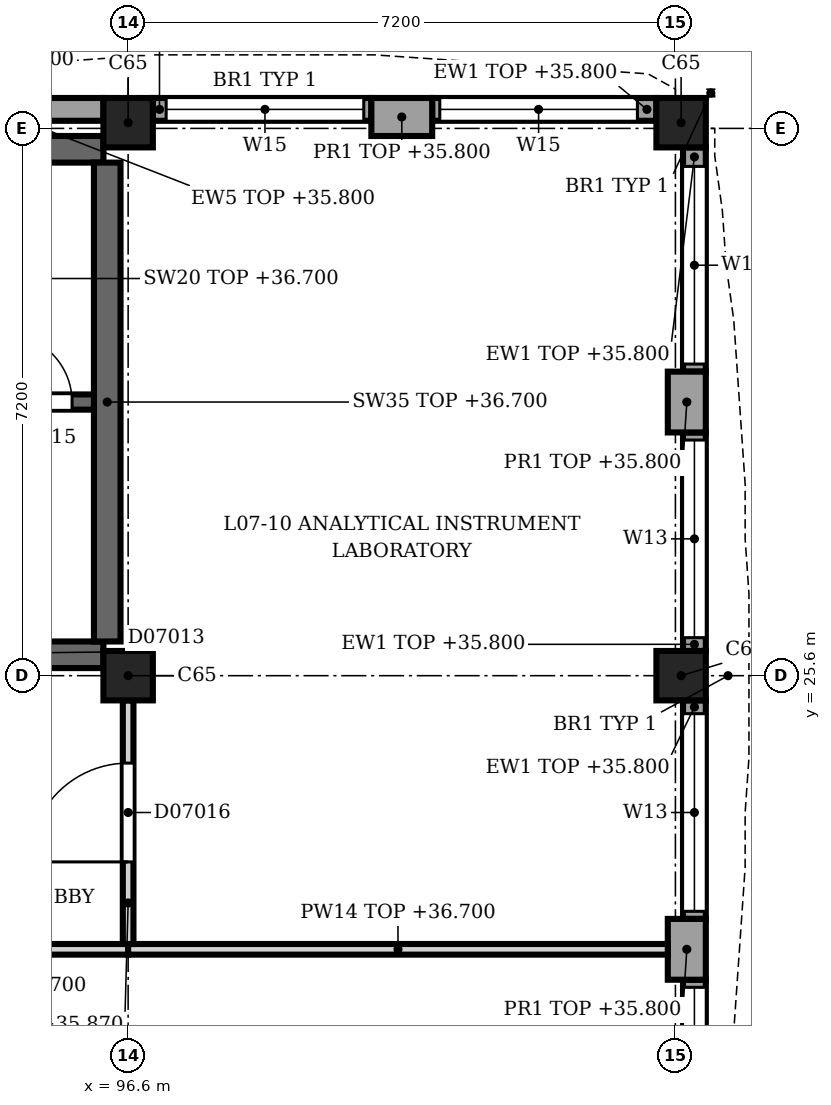
"""IFC4 building model, lengths in metres.
Left out: names, types, materials, properties, quantities, classifications, styles, units other than length and angle.
Written with IfcOpenShell. Run it as: python <this file> out.ifc"""

import sys

from ifc_helpers import new_model, si_unit, direction, frame, frame_2d, origin, origin_2d, place, context, subcontext, project, spatial, rectangle, extrude, element, fill, save


model = new_model("IFC4")
c1 = context("Model", 3, precision=1e-05, world=origin(), true_north=direction((0.0, 1.0)))
c2 = subcontext(c1, "Body", "Model", "MODEL_VIEW")
j1 = project(units=[si_unit("LENGTHUNIT", "METRE"), si_unit("PLANEANGLEUNIT", "RADIAN")], contexts=[c1])
p1 = place(None, origin())
s1 = spatial("IfcSite", under=j1, at=p1, CompositionType="ELEMENT")
p2 = place(p1, origin())
s2 = spatial("IfcBuilding", under=s1, at=p2, CompositionType="ELEMENT")
p3 = place(p2, frame((0.0, 0.0, 32.4)))
s3 = spatial("IfcBuildingStorey", under=s2, at=p3, CompositionType="ELEMENT", Elevation=32.4)
for number, where, z_axis, x_axis in (
    (1, (96.6, 25.6, 0.0), (0.0, 0.0, 1.0), (1.0, 0.0, 0.0)),
    (2, (96.6, 32.875, 0.0), (0.0, 0.0, 1.0), (1.0, 0.0, 0.0)),
    (3, (103.875, 25.6, 0.0), (0.0, 0.0, 1.0), (1.0, 0.0, 0.0)),
    (4, (103.875, 32.875, 0.0), (0.0, 0.0, 1.0), (1.0, 0.0, 0.0)),
):
    element("IfcColumn", number, at=place(p3, frame(where, z_axis=z_axis, x_axis=x_axis)), inside=s3, PredefinedType="COLUMN", context=c2, shape_type="SweptSolid", body=[
        extrude(rectangle(XDim=0.65, YDim=0.65, at=origin_2d()), origin(), (0.0, 0.0, 1.0), 4.5),
    ])
p4 = place(p3, frame((99.8, 32.95, 0.0), z_axis=(0.0, 0.0, 1.0), x_axis=(1.0, 0.0, 0.0)))
e5 = element("IfcWall", 5, at=p4, inside=s3, PredefinedType="SOLIDWALL", context=c2, shape_type="SweptSolid", body=[
    extrude(rectangle(XDim=0.8, YDim=0.5, at=frame_2d((0.4, 0.0))), origin(), (0.0, 0.0, 1.0), 3.4),
])
p5 = place(p3, frame((93.4, 33.05, 0.0), z_axis=(0.0, 0.0, 1.0), x_axis=(1.0, 0.0, 0.0)))
e6 = element("IfcWall", 6, at=p5, inside=s3, PredefinedType="SOLIDWALL", context=c2, shape_type="SweptSolid", body=[
    extrude(rectangle(XDim=2.875, YDim=0.3, at=frame_2d((1.438, 0.0))), origin(), (0.0, 0.0, 1.0), 3.4),
])
p6 = place(p3, frame((96.925, 33.05, 0.0), z_axis=(0.0, 0.0, 1.0), x_axis=(1.0, 0.0, 0.0)))
e7 = element("IfcWall", 7, at=p6, inside=s3, PredefinedType="SOLIDWALL", context=c2, shape_type="SweptSolid", body=[
    extrude(rectangle(XDim=2.875, YDim=0.3, at=frame_2d((1.438, 0.0))), origin(), (0.0, 0.0, 1.0), 3.4),
])
p7 = place(p6, frame((0.175, 0.0, 1.0)))
e8 = element("IfcOpeningElement", 8, at=p7, cuts=e7, PredefinedType="OPENING", context=c2, shape_type="SweptSolid", body=[
    extrude(rectangle(XDim=2.6, YDim=2.0, at=frame_2d((1.3, 1.0))), frame((0.0, 0.16, 0.0), z_axis=(0.0, -1.0, 0.0), x_axis=(1.0, 0.0, 0.0)), (0.0, 0.0, 1.0), 0.32),
])
p8 = place(p3, frame((100.6, 33.05, 0.0), z_axis=(0.0, 0.0, 1.0), x_axis=(1.0, 0.0, 0.0)))
e9 = element("IfcWall", 9, at=p8, inside=s3, PredefinedType="SOLIDWALL", context=c2, shape_type="SweptSolid", body=[
    extrude(rectangle(XDim=2.95, YDim=0.3, at=frame_2d((1.475, 0.0))), origin(), (0.0, 0.0, 1.0), 3.4),
])
p9 = place(p8, frame((0.1, 0.0, 1.0)))
e10 = element("IfcOpeningElement", 10, at=p9, cuts=e9, PredefinedType="OPENING", context=c2, shape_type="SweptSolid", body=[
    extrude(rectangle(XDim=2.6, YDim=2.0, at=frame_2d((1.3, 1.0))), frame((0.0, 0.16, 0.0), z_axis=(0.0, -1.0, 0.0), x_axis=(1.0, 0.0, 0.0)), (0.0, 0.0, 1.0), 0.32),
])
p10 = place(p3, frame((103.95, 29.6, 0.0), z_axis=(0.0, 0.0, 1.0), x_axis=(0.0, -1.0, 0.0)))
e11 = element("IfcWall", 11, at=p10, inside=s3, PredefinedType="SOLIDWALL", context=c2, shape_type="SweptSolid", body=[
    extrude(rectangle(XDim=0.8, YDim=0.5, at=frame_2d((0.4, 0.0))), origin(), (0.0, 0.0, 1.0), 3.4),
])
p11 = place(p3, frame((103.95, 22.4, 0.0), z_axis=(0.0, 0.0, 1.0), x_axis=(0.0, -1.0, 0.0)))
e12 = element("IfcWall", 12, at=p11, inside=s3, PredefinedType="SOLIDWALL", context=c2, shape_type="SweptSolid", body=[
    extrude(rectangle(XDim=0.8, YDim=0.5, at=frame_2d((0.4, 0.0))), origin(), (0.0, 0.0, 1.0), 3.4),
])
p12 = place(p3, frame((104.05, 32.55, 0.0), z_axis=(0.0, 0.0, 1.0), x_axis=(0.0, -1.0, 0.0)))
e13 = element("IfcWall", 13, at=p12, inside=s3, PredefinedType="SOLIDWALL", context=c2, shape_type="SweptSolid", body=[
    extrude(rectangle(XDim=2.95, YDim=0.3, at=frame_2d((1.475, 0.0))), origin(), (0.0, 0.0, 1.0), 3.4),
])
p13 = place(p12, frame((0.25, 0.0, 0.9)))
e14 = element("IfcOpeningElement", 14, at=p13, cuts=e13, PredefinedType="OPENING", context=c2, shape_type="SweptSolid", body=[
    extrude(rectangle(XDim=2.6, YDim=2.2, at=frame_2d((1.3, 1.1))), frame((0.0, 0.16, 0.0), z_axis=(0.0, -1.0, 0.0), x_axis=(1.0, 0.0, 0.0)), (0.0, 0.0, 1.0), 0.32),
])
p14 = place(p3, frame((104.05, 28.8, 0.0), z_axis=(0.0, 0.0, 1.0), x_axis=(0.0, -1.0, 0.0)))
e15 = element("IfcWall", 15, at=p14, inside=s3, PredefinedType="SOLIDWALL", context=c2, shape_type="SweptSolid", body=[
    extrude(rectangle(XDim=2.875, YDim=0.3, at=frame_2d((1.438, 0.0))), origin(), (0.0, 0.0, 1.0), 3.4),
])
p15 = place(p14, frame((0.1, 0.0, 0.9)))
e16 = element("IfcOpeningElement", 16, at=p15, cuts=e15, PredefinedType="OPENING", context=c2, shape_type="SweptSolid", body=[
    extrude(rectangle(XDim=2.6, YDim=2.2, at=frame_2d((1.3, 1.1))), frame((0.0, 0.16, 0.0), z_axis=(0.0, -1.0, 0.0), x_axis=(1.0, 0.0, 0.0)), (0.0, 0.0, 1.0), 0.32),
])
p16 = place(p3, frame((104.05, 25.275, 0.0), z_axis=(0.0, 0.0, 1.0), x_axis=(0.0, -1.0, 0.0)))
e17 = element("IfcWall", 17, at=p16, inside=s3, PredefinedType="SOLIDWALL", context=c2, shape_type="SweptSolid", body=[
    extrude(rectangle(XDim=2.875, YDim=0.3, at=frame_2d((1.438, 0.0))), origin(), (0.0, 0.0, 1.0), 3.4),
])
p17 = place(p16, frame((0.175, 0.0, 0.9)))
e18 = element("IfcOpeningElement", 18, at=p17, cuts=e17, PredefinedType="OPENING", context=c2, shape_type="SweptSolid", body=[
    extrude(rectangle(XDim=2.6, YDim=2.2, at=frame_2d((1.3, 1.1))), frame((0.0, 0.16, 0.0), z_axis=(0.0, -1.0, 0.0), x_axis=(1.0, 0.0, 0.0)), (0.0, 0.0, 1.0), 0.32),
])
p18 = place(p3, frame((104.05, 21.6, 0.0), z_axis=(0.0, 0.0, 1.0), x_axis=(0.0, -1.0, 0.0)))
e19 = element("IfcWall", 19, at=p18, inside=s3, PredefinedType="SOLIDWALL", context=c2, shape_type="SweptSolid", body=[
    extrude(rectangle(XDim=2.875, YDim=0.3, at=frame_2d((1.438, 0.0))), origin(), (0.0, 0.0, 1.0), 3.4),
])
p19 = place(p18, frame((0.1, 0.0, 0.9)))
e20 = element("IfcOpeningElement", 20, at=p19, cuts=e19, PredefinedType="OPENING", context=c2, shape_type="SweptSolid", body=[
    extrude(rectangle(XDim=2.6, YDim=2.2, at=frame_2d((1.3, 1.1))), frame((0.0, 0.16, 0.0), z_axis=(0.0, -1.0, 0.0), x_axis=(1.0, 0.0, 0.0)), (0.0, 0.0, 1.0), 0.32),
])
p20 = place(p3, frame((89.725, 25.875, 0.0), z_axis=(0.0, 0.0, 1.0), x_axis=(1.0, 0.0, 0.0)))
e21 = element("IfcWall", 21, at=p20, inside=s3, PredefinedType="SHEAR", context=c2, shape_type="SweptSolid", body=[
    extrude(rectangle(XDim=6.55, YDim=0.35, at=frame_2d((3.275, 0.0))), origin(), (0.0, 0.0, 1.0), 4.3),
])
p21 = place(p20, frame((2.675, 0.0, 0.0)))
e22 = element("IfcOpeningElement", 22, at=p21, cuts=e21, PredefinedType="OPENING", context=c2, shape_type="SweptSolid", body=[
    extrude(rectangle(XDim=1.8, YDim=2.1, at=frame_2d((0.9, 1.05))), frame((0.0, 0.185, 0.0), z_axis=(0.0, -1.0, 0.0), x_axis=(1.0, 0.0, 0.0)), (0.0, 0.0, 1.0), 0.37),
])
p22 = place(p3, frame((89.725, 32.525, 0.0), z_axis=(0.0, 0.0, 1.0), x_axis=(1.0, 0.0, 0.0)))
e23 = element("IfcWall", 23, at=p22, inside=s3, PredefinedType="SHEAR", context=c2, shape_type="SweptSolid", body=[
    extrude(rectangle(XDim=6.55, YDim=0.35, at=frame_2d((3.275, 0.0))), origin(), (0.0, 0.0, 1.0), 4.3),
])
p23 = place(p3, frame((96.325, 26.05, 0.0), z_axis=(0.0, 0.0, 1.0), x_axis=(0.0, 1.0, 0.0)))
e24 = element("IfcWall", 24, at=p23, inside=s3, PredefinedType="SHEAR", context=c2, shape_type="SweptSolid", body=[
    extrude(rectangle(XDim=6.3, YDim=0.35, at=frame_2d((3.15, 0.0))), origin(), (0.0, 0.0, 1.0), 4.3),
])
p24 = place(p3, frame((96.15, 29.2, 0.0), z_axis=(0.0, 0.0, 1.0), x_axis=(-1.0, 0.0, 0.0)))
e25 = element("IfcWall", 25, at=p24, inside=s3, PredefinedType="SHEAR", context=c2, shape_type="SweptSolid", body=[
    extrude(rectangle(XDim=10.35, YDim=0.2, at=frame_2d((5.175, 0.0))), origin(), (0.0, 0.0, 1.0), 4.3),
])
p25 = place(p24, frame((8.8, 0.0, 0.0)))
e26 = element("IfcOpeningElement", 26, at=p25, cuts=e25, PredefinedType="OPENING", context=c2, shape_type="SweptSolid", body=[
    extrude(rectangle(XDim=1.1, YDim=2.1, at=frame_2d((0.55, 1.05))), frame((0.0, 0.11, 0.0), z_axis=(0.0, -1.0, 0.0), x_axis=(1.0, 0.0, 0.0)), (0.0, 0.0, 1.0), 0.22),
])
p26 = place(p24, frame((6.6, 0.0, 0.0)))
e27 = element("IfcOpeningElement", 27, at=p26, cuts=e25, PredefinedType="OPENING", context=c2, shape_type="SweptSolid", body=[
    extrude(rectangle(XDim=1.1, YDim=2.1, at=frame_2d((0.55, 1.05))), frame((0.0, 0.11, 0.0), z_axis=(0.0, -1.0, 0.0), x_axis=(1.0, 0.0, 0.0)), (0.0, 0.0, 1.0), 0.22),
])
p27 = place(p24, frame((3.75, 0.0, 0.0)))
e28 = element("IfcOpeningElement", 28, at=p27, cuts=e25, PredefinedType="OPENING", context=c2, shape_type="SweptSolid", body=[
    extrude(rectangle(XDim=1.4, YDim=2.1, at=frame_2d((0.7, 1.05))), frame((0.0, 0.11, 0.0), z_axis=(0.0, -1.0, 0.0), x_axis=(1.0, 0.0, 0.0)), (0.0, 0.0, 1.0), 0.22),
])
p28 = place(p24, frame((1.962, 0.0, 0.0)))
e29 = element("IfcOpeningElement", 29, at=p28, cuts=e25, PredefinedType="OPENING", context=c2, shape_type="SweptSolid", body=[
    extrude(rectangle(XDim=0.9, YDim=2.1, at=frame_2d((0.45, 1.05))), frame((0.0, 0.11, 0.0), z_axis=(0.0, -1.0, 0.0), x_axis=(1.0, 0.0, 0.0)), (0.0, 0.0, 1.0), 0.22),
])
p29 = place(p24, frame((0.288, 0.0, 0.0)))
e30 = element("IfcOpeningElement", 30, at=p29, cuts=e25, PredefinedType="OPENING", context=c2, shape_type="SweptSolid", body=[
    extrude(rectangle(XDim=0.9, YDim=2.1, at=frame_2d((0.45, 1.05))), frame((0.0, 0.11, 0.0), z_axis=(0.0, -1.0, 0.0), x_axis=(1.0, 0.0, 0.0)), (0.0, 0.0, 1.0), 0.22),
])
p30 = place(p3, frame((92.93, 22.0, 0.0), z_axis=(0.0, 0.0, 1.0), x_axis=(1.0, 0.0, 0.0)))
e31 = element("IfcWall", 31, at=p30, inside=s3, PredefinedType="PARTITIONING", context=c2, shape_type="SweptSolid", body=[
    extrude(rectangle(XDim=3.67, YDim=0.14, at=frame_2d((1.835, 0.0))), origin(), (0.0, 0.0, 1.0), 4.3),
])
p31 = place(p3, frame((96.6, 22.0, 0.0), z_axis=(0.0, 0.0, 1.0), x_axis=(1.0, 0.0, 0.0)))
e32 = element("IfcWall", 32, at=p31, inside=s3, PredefinedType="PARTITIONING", context=c2, shape_type="SweptSolid", body=[
    extrude(rectangle(XDim=7.1, YDim=0.14, at=frame_2d((3.55, 0.0))), origin(), (0.0, 0.0, 1.0), 4.3),
])
p32 = place(p3, frame((96.6, 25.275, 0.0), z_axis=(0.0, 0.0, 1.0), x_axis=(0.0, -1.0, 0.0)))
e33 = element("IfcWall", 33, at=p32, inside=s3, PredefinedType="PARTITIONING", context=c2, shape_type="SweptSolid", body=[
    extrude(rectangle(XDim=3.205, YDim=0.14, at=frame_2d((1.603, 0.0))), origin(), (0.0, 0.0, 1.0), 3.47),
])
p33 = place(p32, frame((0.825, 0.0, 0.0)))
e34 = element("IfcOpeningElement", 34, at=p33, cuts=e33, PredefinedType="OPENING", context=c2, shape_type="SweptSolid", body=[
    extrude(rectangle(XDim=1.3, YDim=2.2, at=frame_2d((0.65, 1.1))), frame((0.0, 0.08, 0.0), z_axis=(0.0, -1.0, 0.0), x_axis=(1.0, 0.0, 0.0)), (0.0, 0.0, 1.0), 0.16),
])
p34 = place(p7, origin())
e35 = element("IfcWindow", 35, at=p34, inside=s3, PartitioningType="SINGLE_PANEL", PredefinedType="WINDOW", context=c2, shape_type="SweptSolid", body=[
    extrude(rectangle(XDim=2.6, YDim=2.0, at=frame_2d((1.3, 1.0))), frame((0.0, 0.03, 0.0), z_axis=(0.0, -1.0, 0.0), x_axis=(1.0, 0.0, 0.0)), (0.0, 0.0, 1.0), 0.06),
])
fill(e8, e35)
p35 = place(p9, origin())
e36 = element("IfcWindow", 36, at=p35, inside=s3, PartitioningType="SINGLE_PANEL", PredefinedType="WINDOW", context=c2, shape_type="SweptSolid", body=[
    extrude(rectangle(XDim=2.6, YDim=2.0, at=frame_2d((1.3, 1.0))), frame((0.0, 0.03, 0.0), z_axis=(0.0, -1.0, 0.0), x_axis=(1.0, 0.0, 0.0)), (0.0, 0.0, 1.0), 0.06),
])
fill(e10, e36)
p36 = place(p13, origin())
e37 = element("IfcWindow", 37, at=p36, inside=s3, PartitioningType="SINGLE_PANEL", PredefinedType="WINDOW", context=c2, shape_type="SweptSolid", body=[
    extrude(rectangle(XDim=2.6, YDim=2.2, at=frame_2d((1.3, 1.1))), frame((0.0, 0.03, 0.0), z_axis=(0.0, -1.0, 0.0), x_axis=(1.0, 0.0, 0.0)), (0.0, 0.0, 1.0), 0.06),
])
fill(e14, e37)
p37 = place(p15, origin())
e38 = element("IfcWindow", 38, at=p37, inside=s3, PartitioningType="SINGLE_PANEL", PredefinedType="WINDOW", context=c2, shape_type="SweptSolid", body=[
    extrude(rectangle(XDim=2.6, YDim=2.2, at=frame_2d((1.3, 1.1))), frame((0.0, 0.03, 0.0), z_axis=(0.0, -1.0, 0.0), x_axis=(1.0, 0.0, 0.0)), (0.0, 0.0, 1.0), 0.06),
])
fill(e16, e38)
p38 = place(p17, origin())
e39 = element("IfcWindow", 39, at=p38, inside=s3, PartitioningType="SINGLE_PANEL", PredefinedType="WINDOW", context=c2, shape_type="SweptSolid", body=[
    extrude(rectangle(XDim=2.6, YDim=2.2, at=frame_2d((1.3, 1.1))), frame((0.0, 0.03, 0.0), z_axis=(0.0, -1.0, 0.0), x_axis=(1.0, 0.0, 0.0)), (0.0, 0.0, 1.0), 0.06),
])
fill(e18, e39)
p39 = place(p19, origin())
e40 = element("IfcWindow", 40, at=p39, inside=s3, PartitioningType="SINGLE_PANEL", PredefinedType="WINDOW", context=c2, shape_type="SweptSolid", body=[
    extrude(rectangle(XDim=2.6, YDim=2.2, at=frame_2d((1.3, 1.1))), frame((0.0, 0.03, 0.0), z_axis=(0.0, -1.0, 0.0), x_axis=(1.0, 0.0, 0.0)), (0.0, 0.0, 1.0), 0.06),
])
fill(e20, e40)
p40 = place(p29, origin())
e41 = element("IfcDoor", 41, at=p40, inside=s3, OperationType="SINGLE_SWING_LEFT", PredefinedType="DOOR", context=c2, shape_type="SweptSolid", body=[
    extrude(rectangle(XDim=0.9, YDim=2.1, at=frame_2d((0.45, 1.05))), frame((0.0, 0.025, 0.0), z_axis=(0.0, -1.0, 0.0), x_axis=(1.0, 0.0, 0.0)), (0.0, 0.0, 1.0), 0.05),
])
fill(e30, e41)
p41 = place(p33, origin())
e42 = element("IfcDoor", 42, at=p41, inside=s3, OperationType="SINGLE_SWING_LEFT", PredefinedType="DOOR", context=c2, shape_type="SweptSolid", body=[
    extrude(rectangle(XDim=1.3, YDim=2.2, at=frame_2d((0.65, 1.1))), frame((0.0, 0.025, 0.0), z_axis=(0.0, -1.0, 0.0), x_axis=(1.0, 0.0, 0.0)), (0.0, 0.0, 1.0), 0.05),
])
fill(e34, e42)
save(model, sys.argv[1])
